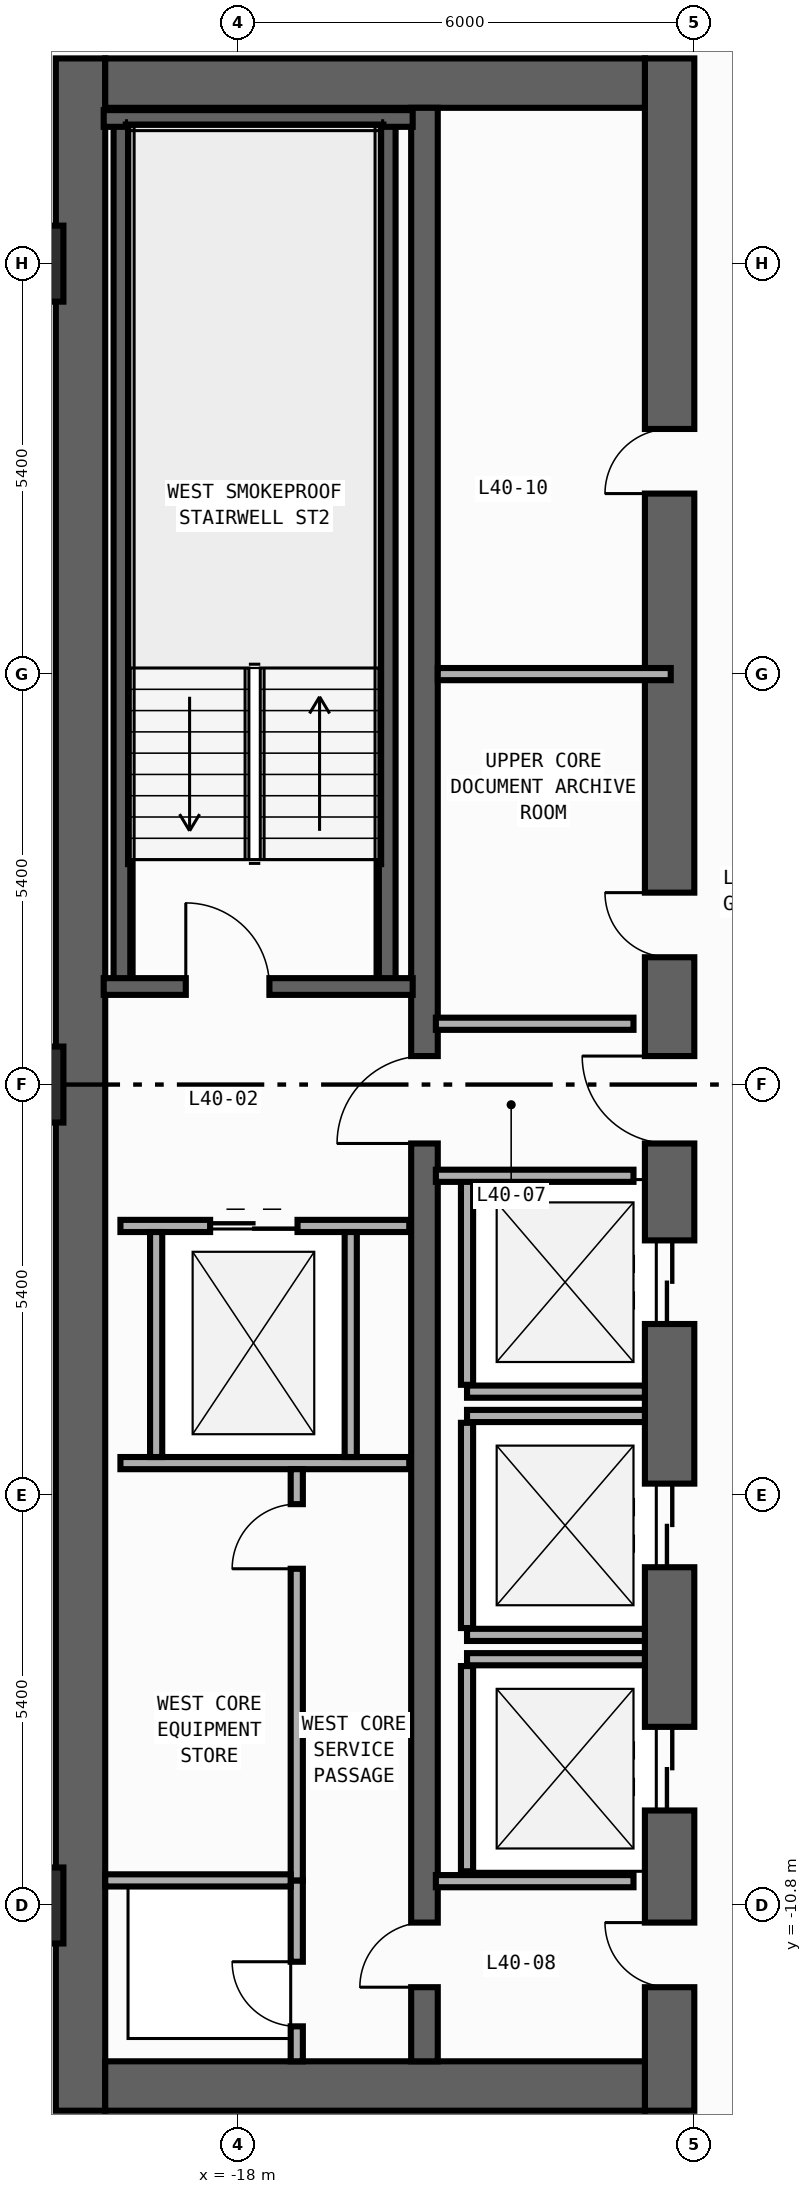
"""IFC4 building model, lengths in metres.
Left out: names, types, materials, properties, quantities, classifications, styles, units other than length and angle.
Written with IfcOpenShell. Run it as: python <this file> out.ifc"""

import sys

from ifc_helpers import new_model, si_unit, direction, frame, frame_2d, origin, origin_2d, place, context, subcontext, project, spatial, rectangle, extrude, element, fill, save


model = new_model("IFC4")
c1 = context("Model", 3, precision=1e-05, world=origin(), true_north=direction((0.0, 1.0)))
c2 = subcontext(c1, "Body", "Model", "MODEL_VIEW")
j1 = project(units=[si_unit("LENGTHUNIT", "METRE"), si_unit("PLANEANGLEUNIT", "RADIAN")], contexts=[c1])
p1 = place(None, origin())
s1 = spatial("IfcSite", under=j1, at=p1, CompositionType="ELEMENT")
p2 = place(p1, origin())
s2 = spatial("IfcBuilding", under=s1, at=p2, CompositionType="ELEMENT")
p3 = place(p2, frame((0.0, 0.0, 176.4)))
s3 = spatial("IfcBuildingStorey", under=s2, at=p3, CompositionType="ELEMENT", Elevation=176.4)
p4 = place(p3, frame((-20.075, -13.5, 0.0), z_axis=(0.0, 0.0, 1.0), x_axis=(0.0, 1.0, 0.0)))
e1 = element("IfcWall", 1, at=p4, inside=s3, PredefinedType="SHEAR", context=c2, shape_type="SweptSolid", body=[
    extrude(rectangle(XDim=27.0, YDim=0.65, at=frame_2d((13.5, 0.0))), origin(), (0.0, 0.0, 1.0), 3.54),
])
p5 = place(p3, frame((-12.325, -13.5, 0.0), z_axis=(0.0, 0.0, 1.0), x_axis=(0.0, 1.0, 0.0)))
e2 = element("IfcWall", 2, at=p5, inside=s3, PredefinedType="SHEAR", context=c2, shape_type="SweptSolid", body=[
    extrude(rectangle(XDim=27.0, YDim=0.65, at=frame_2d((13.5, 0.0))), origin(), (0.0, 0.0, 1.0), 3.54),
])
p6 = place(p5, frame((10.35, 0.0, 0.0)))
e3 = element("IfcOpeningElement", 3, at=p6, cuts=e2, PredefinedType="OPENING", context=c2, shape_type="SweptSolid", body=[
    extrude(rectangle(XDim=1.1, YDim=2.2, at=frame_2d((0.55, 1.1))), frame((0.0, 0.335, 0.0), z_axis=(0.0, -1.0, 0.0), x_axis=(1.0, 0.0, 0.0)), (0.0, 0.0, 1.0), 0.67),
])
p7 = place(p5, frame((7.15, 0.0, 0.0)))
e4 = element("IfcOpeningElement", 4, at=p7, cuts=e2, PredefinedType="OPENING", context=c2, shape_type="SweptSolid", body=[
    extrude(rectangle(XDim=1.1, YDim=2.2, at=frame_2d((0.55, 1.1))), frame((0.0, 0.335, 0.0), z_axis=(0.0, -1.0, 0.0), x_axis=(1.0, 0.0, 0.0)), (0.0, 0.0, 1.0), 0.67),
])
p8 = place(p5, frame((3.95, 0.0, 0.0)))
e5 = element("IfcOpeningElement", 5, at=p8, cuts=e2, PredefinedType="OPENING", context=c2, shape_type="SweptSolid", body=[
    extrude(rectangle(XDim=1.1, YDim=2.2, at=frame_2d((0.55, 1.1))), frame((0.0, 0.335, 0.0), z_axis=(0.0, -1.0, 0.0), x_axis=(1.0, 0.0, 0.0)), (0.0, 0.0, 1.0), 0.67),
])
p9 = place(p5, frame((15.175, 0.0, 0.0)))
e6 = element("IfcOpeningElement", 6, at=p9, cuts=e2, PredefinedType="OPENING", context=c2, shape_type="SweptSolid", body=[
    extrude(rectangle(XDim=0.85, YDim=2.1, at=frame_2d((0.425, 1.05))), frame((0.0, 0.335, 0.0), z_axis=(0.0, -1.0, 0.0), x_axis=(1.0, 0.0, 0.0)), (0.0, 0.0, 1.0), 0.67),
])
p10 = place(p5, frame((21.275, 0.0, 0.0)))
e7 = element("IfcOpeningElement", 7, at=p10, cuts=e2, PredefinedType="OPENING", context=c2, shape_type="SweptSolid", body=[
    extrude(rectangle(XDim=0.85, YDim=2.1, at=frame_2d((0.425, 1.05))), frame((0.0, 0.335, 0.0), z_axis=(0.0, -1.0, 0.0), x_axis=(1.0, 0.0, 0.0)), (0.0, 0.0, 1.0), 0.67),
])
p11 = place(p5, frame((12.725, 0.0, 0.0)))
e8 = element("IfcOpeningElement", 8, at=p11, cuts=e2, PredefinedType="OPENING", context=c2, shape_type="SweptSolid", body=[
    extrude(rectangle(XDim=1.15, YDim=2.2, at=frame_2d((0.575, 1.1))), frame((0.0, 0.335, 0.0), z_axis=(0.0, -1.0, 0.0), x_axis=(1.0, 0.0, 0.0)), (0.0, 0.0, 1.0), 0.67),
])
p12 = place(p5, frame((1.625, 0.0, 0.0)))
e9 = element("IfcOpeningElement", 9, at=p12, cuts=e2, PredefinedType="OPENING", context=c2, shape_type="SweptSolid", body=[
    extrude(rectangle(XDim=0.85, YDim=2.1, at=frame_2d((0.425, 1.05))), frame((0.0, 0.335, 0.0), z_axis=(0.0, -1.0, 0.0), x_axis=(1.0, 0.0, 0.0)), (0.0, 0.0, 1.0), 0.67),
])
for number, where, z_axis, x_axis in (
    (10, (-19.75, -13.175, 0.0), (0.0, 0.0, 1.0), (1.0, 0.0, 0.0)),
    (11, (-19.75, 13.175, 0.0), (0.0, 0.0, 1.0), (1.0, 0.0, 0.0)),
):
    element("IfcWall", number, at=place(p3, frame(where, z_axis=z_axis, x_axis=x_axis)), inside=s3, PredefinedType="SHEAR", context=c2, shape_type="SweptSolid", body=[
        extrude(rectangle(XDim=7.1, YDim=0.65, at=frame_2d((3.55, 0.0))), origin(), (0.0, 0.0, 1.0), 3.54),
    ])
p13 = place(p3, frame((-15.55, -12.85, 0.0), z_axis=(0.0, 0.0, 1.0), x_axis=(0.0, 1.0, 0.0)))
e12 = element("IfcWall", 12, at=p13, inside=s3, PredefinedType="SHEAR", context=c2, shape_type="SweptSolid", body=[
    extrude(rectangle(XDim=25.7, YDim=0.35, at=frame_2d((12.85, 0.0))), origin(), (0.0, 0.0, 1.0), 3.54),
])
p14 = place(p13, frame((12.075, 0.0, 0.0)))
e13 = element("IfcOpeningElement", 13, at=p14, cuts=e12, PredefinedType="OPENING", context=c2, shape_type="SweptSolid", body=[
    extrude(rectangle(XDim=1.15, YDim=2.2, at=frame_2d((0.575, 1.1))), frame((0.0, 0.185, 0.0), z_axis=(0.0, -1.0, 0.0), x_axis=(1.0, 0.0, 0.0)), (0.0, 0.0, 1.0), 0.37),
])
p15 = place(p13, frame((0.975, 0.0, 0.0)))
e14 = element("IfcOpeningElement", 14, at=p15, cuts=e12, PredefinedType="OPENING", context=c2, shape_type="SweptSolid", body=[
    extrude(rectangle(XDim=0.85, YDim=2.1, at=frame_2d((0.425, 1.05))), frame((0.0, 0.185, 0.0), z_axis=(0.0, -1.0, 0.0), x_axis=(1.0, 0.0, 0.0)), (0.0, 0.0, 1.0), 0.37),
])
for number, where, z_axis, x_axis in (
    (15, (-16.04, 1.29, 0.0), (0.0, 0.0, 1.0), (0.0, 1.0, 0.0)),
    (16, (-19.53, 1.29, 0.0), (0.0, 0.0, 1.0), (0.0, 1.0, 0.0)),
):
    element("IfcWall", number, at=place(p3, frame(where, z_axis=z_axis, x_axis=x_axis)), inside=s3, PredefinedType="SHEAR", context=c2, shape_type="SweptSolid", body=[
        extrude(rectangle(XDim=11.42, YDim=0.22, at=frame_2d((5.71, 0.0))), origin(), (0.0, 0.0, 1.0), 3.54),
    ])
p16 = place(p3, frame((-19.77, 12.71, 0.0), z_axis=(0.0, 0.0, 1.0), x_axis=(1.0, 0.0, 0.0)))
e17 = element("IfcWall", 17, at=p16, inside=s3, PredefinedType="SHEAR", context=c2, shape_type="SweptSolid", body=[
    extrude(rectangle(XDim=4.065, YDim=0.22, at=frame_2d((2.032, 0.0))), origin(), (0.0, 0.0, 1.0), 3.54),
])
p17 = place(p3, frame((-19.77, 1.29, 0.0), z_axis=(0.0, 0.0, 1.0), x_axis=(1.0, 0.0, 0.0)))
e18 = element("IfcWall", 18, at=p17, inside=s3, PredefinedType="SHEAR", context=c2, shape_type="SweptSolid", body=[
    extrude(rectangle(XDim=4.065, YDim=0.22, at=frame_2d((2.032, 0.0))), origin(), (0.0, 0.0, 1.0), 3.54),
])
p18 = place(p17, frame((1.08, 0.0, 0.0)))
e19 = element("IfcOpeningElement", 19, at=p18, cuts=e18, PredefinedType="OPENING", context=c2, shape_type="SweptSolid", body=[
    extrude(rectangle(XDim=1.1, YDim=2.2, at=frame_2d((0.55, 1.1))), frame((0.0, 0.12, 0.0), z_axis=(0.0, -1.0, 0.0), x_axis=(1.0, 0.0, 0.0)), (0.0, 0.0, 1.0), 0.24),
])
for number, where, z_axis, x_axis in (
    (20, (-20.8, -10.8, 0.0), (0.0, 0.0, 1.0), (1.0, 0.0, 0.0)),
    (21, (-20.8, 0.0, 0.0), (0.0, 0.0, 1.0), (1.0, 0.0, 0.0)),
    (22, (-20.8, 10.8, 0.0), (0.0, 0.0, 1.0), (1.0, 0.0, 0.0)),
):
    element("IfcColumn", number, at=place(p3, frame(where, z_axis=z_axis, x_axis=x_axis)), inside=s3, PredefinedType="COLUMN", context=c2, shape_type="SweptSolid", body=[
        extrude(rectangle(XDim=1.0, YDim=1.0, at=origin_2d()), origin(), (0.0, 0.0, 1.0), 3.8),
    ])
p19 = place(p3, frame((-14.99, -4.04, 0.0), z_axis=(0.0, 0.0, 1.0), x_axis=(1.0, 0.0, 0.0)))
e23 = element("IfcWall", 23, at=p19, inside=s3, PredefinedType="STANDARD", context=c2, shape_type="SweptSolid", body=[
    extrude(rectangle(XDim=2.34, YDim=0.16, at=frame_2d((1.17, 0.0))), origin(), (0.0, 0.0, 1.0), 3.54),
])
p20 = place(p3, frame((-14.99, -3.95, 0.0), z_axis=(0.0, 0.0, 1.0), x_axis=(0.0, 1.0, 0.0)))
e24 = element("IfcWall", 24, at=p20, inside=s3, PredefinedType="STANDARD", context=c2, shape_type="SweptSolid", body=[
    extrude(rectangle(XDim=2.7, YDim=0.16, at=frame_2d((1.35, 0.0))), origin(), (0.0, 0.0, 1.0), 3.54),
])
for number, where, z_axis, x_axis in (
    (25, (-14.99, -7.24, 0.0), (0.0, 0.0, 1.0), (1.0, 0.0, 0.0)),
    (26, (-14.99, -4.36, 0.0), (0.0, 0.0, 1.0), (1.0, 0.0, 0.0)),
):
    element("IfcWall", number, at=place(p3, frame(where, z_axis=z_axis, x_axis=x_axis)), inside=s3, PredefinedType="STANDARD", context=c2, shape_type="SweptSolid", body=[
        extrude(rectangle(XDim=2.34, YDim=0.16, at=frame_2d((1.17, 0.0))), origin(), (0.0, 0.0, 1.0), 3.54),
    ])
p21 = place(p3, frame((-14.99, -7.15, 0.0), z_axis=(0.0, 0.0, 1.0), x_axis=(0.0, 1.0, 0.0)))
e27 = element("IfcWall", 27, at=p21, inside=s3, PredefinedType="STANDARD", context=c2, shape_type="SweptSolid", body=[
    extrude(rectangle(XDim=2.7, YDim=0.16, at=frame_2d((1.35, 0.0))), origin(), (0.0, 0.0, 1.0), 3.54),
])
p22 = place(p3, frame((-14.99, -7.56, 0.0), z_axis=(0.0, 0.0, 1.0), x_axis=(1.0, 0.0, 0.0)))
e28 = element("IfcWall", 28, at=p22, inside=s3, PredefinedType="STANDARD", context=c2, shape_type="SweptSolid", body=[
    extrude(rectangle(XDim=2.34, YDim=0.16, at=frame_2d((1.17, 0.0))), origin(), (0.0, 0.0, 1.0), 3.54),
])
p23 = place(p3, frame((-14.99, -10.35, 0.0), z_axis=(0.0, 0.0, 1.0), x_axis=(0.0, 1.0, 0.0)))
e29 = element("IfcWall", 29, at=p23, inside=s3, PredefinedType="STANDARD", context=c2, shape_type="SweptSolid", body=[
    extrude(rectangle(XDim=2.7, YDim=0.16, at=frame_2d((1.35, 0.0))), origin(), (0.0, 0.0, 1.0), 3.54),
])
p24 = place(p3, frame((-19.55, -1.86, 0.0), z_axis=(0.0, 0.0, 1.0), x_axis=(1.0, 0.0, 0.0)))
e30 = element("IfcWall", 30, at=p24, inside=s3, PredefinedType="STANDARD", context=c2, shape_type="SweptSolid", body=[
    extrude(rectangle(XDim=3.8, YDim=0.16, at=frame_2d((1.9, 0.0))), origin(), (0.0, 0.0, 1.0), 3.54),
])
p25 = place(p24, frame((1.18, 0.0, 0.0)))
e31 = element("IfcOpeningElement", 31, at=p25, cuts=e30, PredefinedType="OPENING", context=c2, shape_type="SweptSolid", body=[
    extrude(rectangle(XDim=1.15, YDim=2.2, at=frame_2d((0.575, 1.1))), frame((0.0, 0.09, 0.0), z_axis=(0.0, -1.0, 0.0), x_axis=(1.0, 0.0, 0.0)), (0.0, 0.0, 1.0), 0.18),
])
p26 = place(p3, frame((-19.55, -4.98, 0.0), z_axis=(0.0, 0.0, 1.0), x_axis=(1.0, 0.0, 0.0)))
e32 = element("IfcWall", 32, at=p26, inside=s3, PredefinedType="STANDARD", context=c2, shape_type="SweptSolid", body=[
    extrude(rectangle(XDim=3.8, YDim=0.16, at=frame_2d((1.9, 0.0))), origin(), (0.0, 0.0, 1.0), 3.54),
])
for number, where, z_axis, x_axis in (
    (33, (-19.08, -4.9, 0.0), (0.0, 0.0, 1.0), (0.0, 1.0, 0.0)),
    (34, (-16.52, -4.9, 0.0), (0.0, 0.0, 1.0), (0.0, 1.0, 0.0)),
):
    element("IfcWall", number, at=place(p3, frame(where, z_axis=z_axis, x_axis=x_axis)), inside=s3, PredefinedType="STANDARD", context=c2, shape_type="SweptSolid", body=[
        extrude(rectangle(XDim=2.96, YDim=0.16, at=frame_2d((1.48, 0.0))), origin(), (0.0, 0.0, 1.0), 3.54),
    ])
for number, where, z_axis, x_axis in (
    (35, (-15.4, 0.8, 0.0), (0.0, 0.0, 1.0), (1.0, 0.0, 0.0)),
    (36, (-15.4, -1.2, 0.0), (0.0, 0.0, 1.0), (1.0, 0.0, 0.0)),
    (37, (-15.4, -10.48, 0.0), (0.0, 0.0, 1.0), (1.0, 0.0, 0.0)),
):
    element("IfcWall", number, at=place(p3, frame(where, z_axis=z_axis, x_axis=x_axis)), inside=s3, PredefinedType="STANDARD", context=c2, shape_type="SweptSolid", body=[
        extrude(rectangle(XDim=2.6, YDim=0.16, at=frame_2d((1.3, 0.0))), origin(), (0.0, 0.0, 1.0), 3.54),
    ])
p27 = place(p3, frame((-17.23, -12.85, 0.0), z_axis=(0.0, 0.0, 1.0), x_axis=(0.0, 1.0, 0.0)))
e38 = element("IfcWall", 38, at=p27, inside=s3, PredefinedType="PARTITIONING", context=c2, shape_type="SweptSolid", body=[
    extrude(rectangle(XDim=2.38, YDim=0.16, at=frame_2d((1.19, 0.0))), origin(), (0.0, 0.0, 1.0), 3.54),
])
p28 = place(p27, frame((0.46, 0.0, 0.0)))
e39 = element("IfcOpeningElement", 39, at=p28, cuts=e38, PredefinedType="OPENING", context=c2, shape_type="SweptSolid", body=[
    extrude(rectangle(XDim=0.85, YDim=2.1, at=frame_2d((0.425, 1.05))), frame((0.0, 0.09, 0.0), z_axis=(0.0, -1.0, 0.0), x_axis=(1.0, 0.0, 0.0)), (0.0, 0.0, 1.0), 0.18),
])
p29 = place(p3, frame((-17.23, -10.47, 0.0), z_axis=(0.0, 0.0, 1.0), x_axis=(0.0, 1.0, 0.0)))
e40 = element("IfcWall", 40, at=p29, inside=s3, PredefinedType="PARTITIONING", context=c2, shape_type="SweptSolid", body=[
    extrude(rectangle(XDim=5.41, YDim=0.16, at=frame_2d((2.705, 0.0))), origin(), (0.0, 0.0, 1.0), 3.54),
])
p30 = place(p29, frame((4.1, 0.0, 0.0)))
e41 = element("IfcOpeningElement", 41, at=p30, cuts=e40, PredefinedType="OPENING", context=c2, shape_type="SweptSolid", body=[
    extrude(rectangle(XDim=0.85, YDim=2.1, at=frame_2d((0.425, 1.05))), frame((0.0, 0.09, 0.0), z_axis=(0.0, -1.0, 0.0), x_axis=(1.0, 0.0, 0.0)), (0.0, 0.0, 1.0), 0.18),
])
p31 = place(p3, frame((-19.75, -10.47, 0.0), z_axis=(0.0, 0.0, 1.0), x_axis=(1.0, 0.0, 0.0)))
e42 = element("IfcWall", 42, at=p31, inside=s3, PredefinedType="PARTITIONING", context=c2, shape_type="SweptSolid", body=[
    extrude(rectangle(XDim=2.44, YDim=0.16, at=frame_2d((1.22, 0.0))), origin(), (0.0, 0.0, 1.0), 3.54),
])
p32 = place(p3, frame((-15.375, 5.4, 0.0), z_axis=(0.0, 0.0, 1.0), x_axis=(1.0, 0.0, 0.0)))
e43 = element("IfcWall", 43, at=p32, inside=s3, PredefinedType="PARTITIONING", context=c2, shape_type="SweptSolid", body=[
    extrude(rectangle(XDim=3.065, YDim=0.16, at=frame_2d((1.532, 0.0))), origin(), (0.0, 0.0, 1.0), 3.54),
])
p33 = place(p18, origin())
e44 = element("IfcDoor", 44, at=p33, inside=s3, OperationType="SINGLE_SWING_LEFT", PredefinedType="DOOR", context=c2, shape_type="SweptSolid", body=[
    extrude(rectangle(XDim=1.1, YDim=2.2, at=frame_2d((0.55, 1.1))), frame((0.0, 0.025, 0.0), z_axis=(0.0, -1.0, 0.0), x_axis=(1.0, 0.0, 0.0)), (0.0, 0.0, 1.0), 0.05),
])
fill(e19, e44)
p34 = place(p6, origin())
e45 = element("IfcDoor", 45, at=p34, inside=s3, OperationType="DOUBLE_DOOR_SLIDING", PredefinedType="DOOR", context=c2, shape_type="SweptSolid", body=[
    extrude(rectangle(XDim=1.1, YDim=2.2, at=frame_2d((0.55, 1.1))), frame((0.0, 0.025, 0.0), z_axis=(0.0, -1.0, 0.0), x_axis=(1.0, 0.0, 0.0)), (0.0, 0.0, 1.0), 0.05),
])
fill(e3, e45)
p35 = place(p7, origin())
e46 = element("IfcDoor", 46, at=p35, inside=s3, OperationType="DOUBLE_DOOR_SLIDING", PredefinedType="DOOR", context=c2, shape_type="SweptSolid", body=[
    extrude(rectangle(XDim=1.1, YDim=2.2, at=frame_2d((0.55, 1.1))), frame((0.0, 0.025, 0.0), z_axis=(0.0, -1.0, 0.0), x_axis=(1.0, 0.0, 0.0)), (0.0, 0.0, 1.0), 0.05),
])
fill(e4, e46)
p36 = place(p8, origin())
e47 = element("IfcDoor", 47, at=p36, inside=s3, OperationType="DOUBLE_DOOR_SLIDING", PredefinedType="DOOR", context=c2, shape_type="SweptSolid", body=[
    extrude(rectangle(XDim=1.1, YDim=2.2, at=frame_2d((0.55, 1.1))), frame((0.0, 0.025, 0.0), z_axis=(0.0, -1.0, 0.0), x_axis=(1.0, 0.0, 0.0)), (0.0, 0.0, 1.0), 0.05),
])
fill(e5, e47)
p37 = place(p9, origin())
e48 = element("IfcDoor", 48, at=p37, inside=s3, OperationType="SINGLE_SWING_RIGHT", PredefinedType="DOOR", context=c2, shape_type="SweptSolid", body=[
    extrude(rectangle(XDim=0.85, YDim=2.1, at=frame_2d((0.425, 1.05))), frame((0.0, 0.025, 0.0), z_axis=(0.0, -1.0, 0.0), x_axis=(1.0, 0.0, 0.0)), (0.0, 0.0, 1.0), 0.05),
])
fill(e6, e48)
p38 = place(p10, origin())
e49 = element("IfcDoor", 49, at=p38, inside=s3, OperationType="SINGLE_SWING_LEFT", PredefinedType="DOOR", context=c2, shape_type="SweptSolid", body=[
    extrude(rectangle(XDim=0.85, YDim=2.1, at=frame_2d((0.425, 1.05))), frame((0.0, 0.025, 0.0), z_axis=(0.0, -1.0, 0.0), x_axis=(1.0, 0.0, 0.0)), (0.0, 0.0, 1.0), 0.05),
])
fill(e7, e49)
p39 = place(p11, origin())
e50 = element("IfcDoor", 50, at=p39, inside=s3, OperationType="SINGLE_SWING_RIGHT", PredefinedType="DOOR", context=c2, shape_type="SweptSolid", body=[
    extrude(rectangle(XDim=1.15, YDim=2.2, at=frame_2d((0.575, 1.1))), frame((0.0, 0.025, 0.0), z_axis=(0.0, -1.0, 0.0), x_axis=(1.0, 0.0, 0.0)), (0.0, 0.0, 1.0), 0.05),
])
fill(e8, e50)
p40 = place(p14, origin())
e51 = element("IfcDoor", 51, at=p40, inside=s3, OperationType="SINGLE_SWING_LEFT", PredefinedType="DOOR", context=c2, shape_type="SweptSolid", body=[
    extrude(rectangle(XDim=1.15, YDim=2.2, at=frame_2d((0.575, 1.1))), frame((0.0, 0.025, 0.0), z_axis=(0.0, -1.0, 0.0), x_axis=(1.0, 0.0, 0.0)), (0.0, 0.0, 1.0), 0.05),
])
fill(e13, e51)
p41 = place(p12, origin())
e52 = element("IfcDoor", 52, at=p41, inside=s3, OperationType="SINGLE_SWING_RIGHT", PredefinedType="DOOR", context=c2, shape_type="SweptSolid", body=[
    extrude(rectangle(XDim=0.85, YDim=2.1, at=frame_2d((0.425, 1.05))), frame((0.0, 0.025, 0.0), z_axis=(0.0, -1.0, 0.0), x_axis=(1.0, 0.0, 0.0)), (0.0, 0.0, 1.0), 0.05),
])
fill(e9, e52)
p42 = place(p15, origin())
e53 = element("IfcDoor", 53, at=p42, inside=s3, OperationType="SINGLE_SWING_LEFT", PredefinedType="DOOR", context=c2, shape_type="SweptSolid", body=[
    extrude(rectangle(XDim=0.85, YDim=2.1, at=frame_2d((0.425, 1.05))), frame((0.0, 0.025, 0.0), z_axis=(0.0, -1.0, 0.0), x_axis=(1.0, 0.0, 0.0)), (0.0, 0.0, 1.0), 0.05),
])
fill(e14, e53)
p43 = place(p25, origin())
e54 = element("IfcDoor", 54, at=p43, inside=s3, OperationType="DOUBLE_DOOR_SLIDING", PredefinedType="DOOR", context=c2, shape_type="SweptSolid", body=[
    extrude(rectangle(XDim=1.15, YDim=2.2, at=frame_2d((0.575, 1.1))), frame((0.0, 0.025, 0.0), z_axis=(0.0, -1.0, 0.0), x_axis=(1.0, 0.0, 0.0)), (0.0, 0.0, 1.0), 0.05),
])
fill(e31, e54)
p44 = place(p28, origin())
e55 = element("IfcDoor", 55, at=p44, inside=s3, OperationType="SINGLE_SWING_RIGHT", PredefinedType="DOOR", context=c2, shape_type="SweptSolid", body=[
    extrude(rectangle(XDim=0.85, YDim=2.1, at=frame_2d((0.425, 1.05))), frame((0.0, 0.025, 0.0), z_axis=(0.0, -1.0, 0.0), x_axis=(1.0, 0.0, 0.0)), (0.0, 0.0, 1.0), 0.05),
])
fill(e39, e55)
p45 = place(p30, origin())
e56 = element("IfcDoor", 56, at=p45, inside=s3, OperationType="SINGLE_SWING_LEFT", PredefinedType="DOOR", context=c2, shape_type="SweptSolid", body=[
    extrude(rectangle(XDim=0.85, YDim=2.1, at=frame_2d((0.425, 1.05))), frame((0.0, 0.025, 0.0), z_axis=(0.0, -1.0, 0.0), x_axis=(1.0, 0.0, 0.0)), (0.0, 0.0, 1.0), 0.05),
])
fill(e41, e56)
save(model, sys.argv[1])
